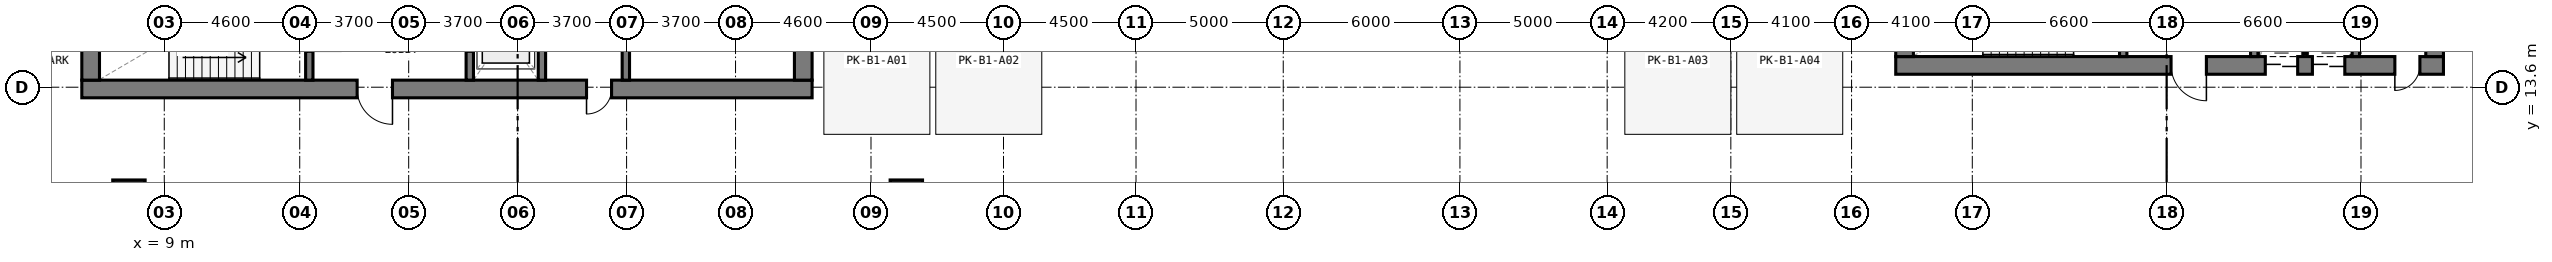
"""IFC4 building model, lengths in metres.
Left out: names, types, materials, properties, quantities, classifications, styles, units other than length and angle.
Written with IfcOpenShell. Run it as: python <this file> out.ifc"""

import sys

from ifc_helpers import new_model, si_unit, direction, frame, frame_2d, origin, origin_2d, place, context, subcontext, project, spatial, rectangle, extrude, element, fill, save


model = new_model("IFC4")
c1 = context("Model", 3, precision=1e-05, world=origin(), true_north=direction((0.0, 1.0)))
c2 = subcontext(c1, "Body", "Model", "MODEL_VIEW")
j1 = project(units=[si_unit("LENGTHUNIT", "METRE"), si_unit("PLANEANGLEUNIT", "RADIAN")], contexts=[c1])
p1 = place(None, origin())
s1 = spatial("IfcSite", under=j1, at=p1, CompositionType="ELEMENT")
p2 = place(p1, origin())
s2 = spatial("IfcBuilding", under=s1, at=p2, CompositionType="ELEMENT")
p3 = place(p2, frame((0.0, 0.0, -4.2)))
s3 = spatial("IfcBuildingStorey", under=s2, at=p3, CompositionType="ELEMENT", Elevation=-4.2)
p4 = place(p3, frame((6.2, 13.54, 0.0), z_axis=(0.0, 0.0, 1.0), x_axis=(1.0, 0.0, 0.0)))
e1 = element("IfcWall", 1, at=p4, inside=s3, PredefinedType="SHEAR", context=c2, shape_type="SweptSolid", body=[
    extrude(rectangle(XDim=24.8, YDim=0.6, at=frame_2d((12.4, 0.0))), origin(), (0.0, 0.0, 1.0), 4.2),
])
p5 = place(p4, frame((9.35, 0.0, 0.0)))
e2 = element("IfcOpeningElement", 2, at=p5, cuts=e1, PredefinedType="OPENING", context=c2, shape_type="SweptSolid", body=[
    extrude(rectangle(XDim=1.2, YDim=2.15, at=frame_2d((0.6, 1.075))), frame((0.0, 0.31, 0.0), z_axis=(0.0, -1.0, 0.0), x_axis=(1.0, 0.0, 0.0)), (0.0, 0.0, 1.0), 0.62),
])
p6 = place(p4, frame((17.14, 0.0, 0.0)))
e3 = element("IfcOpeningElement", 3, at=p6, cuts=e1, PredefinedType="OPENING", context=c2, shape_type="SweptSolid", body=[
    extrude(rectangle(XDim=0.85, YDim=2.1, at=frame_2d((0.425, 1.05))), frame((0.0, 0.31, 0.0), z_axis=(0.0, -1.0, 0.0), x_axis=(1.0, 0.0, 0.0)), (0.0, 0.0, 1.0), 0.62),
])
for number, where, z_axis, x_axis in (
    (4, (6.5, 13.84, 0.0), (0.0, 0.0, 1.0), (0.0, 1.0, 0.0)),
    (5, (30.7, 13.84, 0.0), (0.0, 0.0, 1.0), (0.0, 1.0, 0.0)),
):
    element("IfcWall", number, at=place(p3, frame(where, z_axis=z_axis, x_axis=x_axis)), inside=s3, PredefinedType="SHEAR", context=c2, shape_type="SweptSolid", body=[
        extrude(rectangle(XDim=3.16, YDim=0.6, at=frame_2d((1.58, 0.0))), origin(), (0.0, 0.0, 1.0), 4.2),
    ])
p7 = place(p3, frame((13.925, 13.84, 0.0), z_axis=(0.0, 0.0, 1.0), x_axis=(0.0, 1.0, 0.0)))
e6 = element("IfcWall", 6, at=p7, inside=s3, PredefinedType="STANDARD", context=c2, shape_type="SweptSolid", body=[
    extrude(rectangle(XDim=3.16, YDim=0.25, at=frame_2d((1.58, 0.0))), origin(), (0.0, 0.0, 1.0), 3.85),
])
p8 = place(p7, frame((0.98, 0.0, 0.0)))
e7 = element("IfcOpeningElement", 7, at=p8, cuts=e6, PredefinedType="OPENING", context=c2, shape_type="SweptSolid", body=[
    extrude(rectangle(XDim=1.1, YDim=2.15, at=frame_2d((0.55, 1.075))), frame((0.0, 0.135, 0.0), z_axis=(0.0, -1.0, 0.0), x_axis=(1.0, 0.0, 0.0)), (0.0, 0.0, 1.0), 0.27),
])
p9 = place(p3, frame((19.375, 13.84, 0.0), z_axis=(0.0, 0.0, 1.0), x_axis=(0.0, 1.0, 0.0)))
e8 = element("IfcWall", 8, at=p9, inside=s3, PredefinedType="STANDARD", context=c2, shape_type="SweptSolid", body=[
    extrude(rectangle(XDim=3.16, YDim=0.25, at=frame_2d((1.58, 0.0))), origin(), (0.0, 0.0, 1.0), 3.85),
])
p10 = place(p9, frame((0.98, 0.0, 0.0)))
e9 = element("IfcOpeningElement", 9, at=p10, cuts=e8, PredefinedType="OPENING", context=c2, shape_type="SweptSolid", body=[
    extrude(rectangle(XDim=1.1, YDim=2.15, at=frame_2d((0.55, 1.075))), frame((0.0, 0.135, 0.0), z_axis=(0.0, -1.0, 0.0), x_axis=(1.0, 0.0, 0.0)), (0.0, 0.0, 1.0), 0.27),
])
for number, where, z_axis, x_axis in (
    (10, (21.825, 13.84, 0.0), (0.0, 0.0, 1.0), (0.0, 1.0, 0.0)),
    (11, (24.675, 13.84, 0.0), (0.0, 0.0, 1.0), (0.0, 1.0, 0.0)),
):
    element("IfcWall", number, at=place(p3, frame(where, z_axis=z_axis, x_axis=x_axis)), inside=s3, PredefinedType="STANDARD", context=c2, shape_type="SweptSolid", body=[
        extrude(rectangle(XDim=3.16, YDim=0.25, at=frame_2d((1.58, 0.0))), origin(), (0.0, 0.0, 1.0), 3.85),
    ])
p11 = place(p3, frame((67.8, 14.34, 0.0), z_axis=(0.0, 0.0, 1.0), x_axis=(1.0, 0.0, 0.0)))
e12 = element("IfcWall", 12, at=p11, inside=s3, PredefinedType="SHEAR", context=c2, shape_type="SweptSolid", body=[
    extrude(rectangle(XDim=18.6, YDim=0.6, at=frame_2d((9.3, 0.0))), origin(), (0.0, 0.0, 1.0), 4.2),
])
p12 = place(p11, frame((9.35, 0.0, 0.0)))
e13 = element("IfcOpeningElement", 13, at=p12, cuts=e12, PredefinedType="OPENING", context=c2, shape_type="SweptSolid", body=[
    extrude(rectangle(XDim=1.2, YDim=2.15, at=frame_2d((0.6, 1.075))), frame((0.0, 0.31, 0.0), z_axis=(0.0, -1.0, 0.0), x_axis=(1.0, 0.0, 0.0)), (0.0, 0.0, 1.0), 0.62),
])
p13 = place(p11, frame((16.95, 0.0, 0.0)))
e14 = element("IfcOpeningElement", 14, at=p13, cuts=e12, PredefinedType="OPENING", context=c2, shape_type="SweptSolid", body=[
    extrude(rectangle(XDim=0.85, YDim=2.1, at=frame_2d((0.425, 1.05))), frame((0.0, 0.31, 0.0), z_axis=(0.0, -1.0, 0.0), x_axis=(1.0, 0.0, 0.0)), (0.0, 0.0, 1.0), 0.62),
])
p14 = place(p11, frame((12.55, 0.0, 0.0)))
e15 = element("IfcOpeningElement", 15, at=p14, cuts=e12, PredefinedType="OPENING", context=c2, shape_type="SweptSolid", body=[
    extrude(rectangle(XDim=1.1, YDim=2.15, at=frame_2d((0.55, 1.075))), frame((0.0, 0.31, 0.0), z_axis=(0.0, -1.0, 0.0), x_axis=(1.0, 0.0, 0.0)), (0.0, 0.0, 1.0), 0.62),
])
p15 = place(p11, frame((14.15, 0.0, 0.0)))
e16 = element("IfcOpeningElement", 16, at=p15, cuts=e12, PredefinedType="OPENING", context=c2, shape_type="SweptSolid", body=[
    extrude(rectangle(XDim=1.1, YDim=2.15, at=frame_2d((0.55, 1.075))), frame((0.0, 0.31, 0.0), z_axis=(0.0, -1.0, 0.0), x_axis=(1.0, 0.0, 0.0)), (0.0, 0.0, 1.0), 0.62),
])
for number, where, z_axis, x_axis in (
    (17, (68.1, 14.64, 0.0), (0.0, 0.0, 1.0), (0.0, 1.0, 0.0)),
    (18, (86.1, 14.64, 0.0), (0.0, 0.0, 1.0), (0.0, 1.0, 0.0)),
):
    element("IfcWall", number, at=place(p3, frame(where, z_axis=z_axis, x_axis=x_axis)), inside=s3, PredefinedType="SHEAR", context=c2, shape_type="SweptSolid", body=[
        extrude(rectangle(XDim=3.16, YDim=0.6, at=frame_2d((1.58, 0.0))), origin(), (0.0, 0.0, 1.0), 4.2),
    ])
p16 = place(p3, frame((75.525, 14.64, 0.0), z_axis=(0.0, 0.0, 1.0), x_axis=(0.0, 1.0, 0.0)))
e19 = element("IfcWall", 19, at=p16, inside=s3, PredefinedType="STANDARD", context=c2, shape_type="SweptSolid", body=[
    extrude(rectangle(XDim=3.16, YDim=0.25, at=frame_2d((1.58, 0.0))), origin(), (0.0, 0.0, 1.0), 3.85),
])
p17 = place(p16, frame((0.98, 0.0, 0.0)))
e20 = element("IfcOpeningElement", 20, at=p17, cuts=e19, PredefinedType="OPENING", context=c2, shape_type="SweptSolid", body=[
    extrude(rectangle(XDim=1.1, YDim=2.15, at=frame_2d((0.55, 1.075))), frame((0.0, 0.135, 0.0), z_axis=(0.0, -1.0, 0.0), x_axis=(1.0, 0.0, 0.0)), (0.0, 0.0, 1.0), 0.27),
])
for number, where, z_axis, x_axis in (
    (21, (79.975, 14.64, 0.0), (0.0, 0.0, 1.0), (0.0, 1.0, 0.0)),
    (22, (83.425, 14.64, 0.0), (0.0, 0.0, 1.0), (0.0, 1.0, 0.0)),
):
    element("IfcWall", number, at=place(p3, frame(where, z_axis=z_axis, x_axis=x_axis)), inside=s3, PredefinedType="STANDARD", context=c2, shape_type="SweptSolid", body=[
        extrude(rectangle(XDim=3.16, YDim=0.25, at=frame_2d((1.58, 0.0))), origin(), (0.0, 0.0, 1.0), 3.85),
    ])
for number, where, z_axis, x_axis in (
    (23, (7.8, 9.8, 0.0), (0.0, 0.0, 1.0), (1.0, 0.0, 0.0)),
    (24, (34.2, 9.8, 0.0), (0.0, 0.0, 1.0), (1.0, 0.0, 0.0)),
):
    element("IfcColumn", number, at=place(p3, frame(where, z_axis=z_axis, x_axis=x_axis)), inside=s3, PredefinedType="COLUMN", context=c2, shape_type="SweptSolid", body=[
        extrude(rectangle(XDim=1.1, YDim=1.3, at=origin_2d()), origin(), (0.0, 0.0, 1.0), 4.2),
    ])
p18 = place(p3, frame((81.7, 14.74, 0.0), z_axis=(0.0, 0.0, 1.0), x_axis=(0.0, 1.0, 0.0)))
e25 = element("IfcWall", 25, at=p18, inside=s3, PredefinedType="PARTITIONING", context=c2, shape_type="SweptSolid", body=[
    extrude(rectangle(XDim=2.96, YDim=0.15, at=frame_2d((1.48, 0.0))), origin(), (0.0, 0.0, 1.0), 3.85),
])
p19 = place(p5, frame((1.2, 0.0, 0.0), z_axis=(0.0, 0.0, 1.0), x_axis=(-1.0, 0.0, 0.0)))
e26 = element("IfcDoor", 26, at=p19, inside=s3, OperationType="SINGLE_SWING_LEFT", PredefinedType="DOOR", context=c2, shape_type="SweptSolid", body=[
    extrude(rectangle(XDim=1.2, YDim=2.15, at=frame_2d((0.6, 1.075))), frame((0.0, 0.025, 0.0), z_axis=(0.0, -1.0, 0.0), x_axis=(1.0, 0.0, 0.0)), (0.0, 0.0, 1.0), 0.05),
])
fill(e2, e26)
p20 = place(p6, frame((0.85, 0.0, 0.0), z_axis=(0.0, 0.0, 1.0), x_axis=(-1.0, 0.0, 0.0)))
e27 = element("IfcDoor", 27, at=p20, inside=s3, OperationType="SINGLE_SWING_RIGHT", PredefinedType="DOOR", context=c2, shape_type="SweptSolid", body=[
    extrude(rectangle(XDim=0.85, YDim=2.1, at=frame_2d((0.425, 1.05))), frame((0.0, 0.025, 0.0), z_axis=(0.0, -1.0, 0.0), x_axis=(1.0, 0.0, 0.0)), (0.0, 0.0, 1.0), 0.05),
])
fill(e3, e27)
p21 = place(p12, frame((1.2, 0.0, 0.0), z_axis=(0.0, 0.0, 1.0), x_axis=(-1.0, 0.0, 0.0)))
e28 = element("IfcDoor", 28, at=p21, inside=s3, OperationType="SINGLE_SWING_LEFT", PredefinedType="DOOR", context=c2, shape_type="SweptSolid", body=[
    extrude(rectangle(XDim=1.2, YDim=2.15, at=frame_2d((0.6, 1.075))), frame((0.0, 0.025, 0.0), z_axis=(0.0, -1.0, 0.0), x_axis=(1.0, 0.0, 0.0)), (0.0, 0.0, 1.0), 0.05),
])
fill(e13, e28)
p22 = place(p13, frame((0.85, 0.0, 0.0), z_axis=(0.0, 0.0, 1.0), x_axis=(-1.0, 0.0, 0.0)))
e29 = element("IfcDoor", 29, at=p22, inside=s3, OperationType="SINGLE_SWING_RIGHT", PredefinedType="DOOR", context=c2, shape_type="SweptSolid", body=[
    extrude(rectangle(XDim=0.85, YDim=2.1, at=frame_2d((0.425, 1.05))), frame((0.0, 0.025, 0.0), z_axis=(0.0, -1.0, 0.0), x_axis=(1.0, 0.0, 0.0)), (0.0, 0.0, 1.0), 0.05),
])
fill(e14, e29)
p23 = place(p14, frame((1.1, 0.0, 0.0), z_axis=(0.0, 0.0, 1.0), x_axis=(-1.0, 0.0, 0.0)))
e30 = element("IfcDoor", 30, at=p23, inside=s3, OperationType="DOUBLE_DOOR_SLIDING", PredefinedType="DOOR", context=c2, shape_type="SweptSolid", body=[
    extrude(rectangle(XDim=1.1, YDim=2.15, at=frame_2d((0.55, 1.075))), frame((0.0, 0.025, 0.0), z_axis=(0.0, -1.0, 0.0), x_axis=(1.0, 0.0, 0.0)), (0.0, 0.0, 1.0), 0.05),
])
fill(e15, e30)
p24 = place(p15, frame((1.1, 0.0, 0.0), z_axis=(0.0, 0.0, 1.0), x_axis=(-1.0, 0.0, 0.0)))
e31 = element("IfcDoor", 31, at=p24, inside=s3, OperationType="DOUBLE_DOOR_SLIDING", PredefinedType="DOOR", context=c2, shape_type="SweptSolid", body=[
    extrude(rectangle(XDim=1.1, YDim=2.15, at=frame_2d((0.55, 1.075))), frame((0.0, 0.025, 0.0), z_axis=(0.0, -1.0, 0.0), x_axis=(1.0, 0.0, 0.0)), (0.0, 0.0, 1.0), 0.05),
])
fill(e16, e31)
save(model, sys.argv[1])
